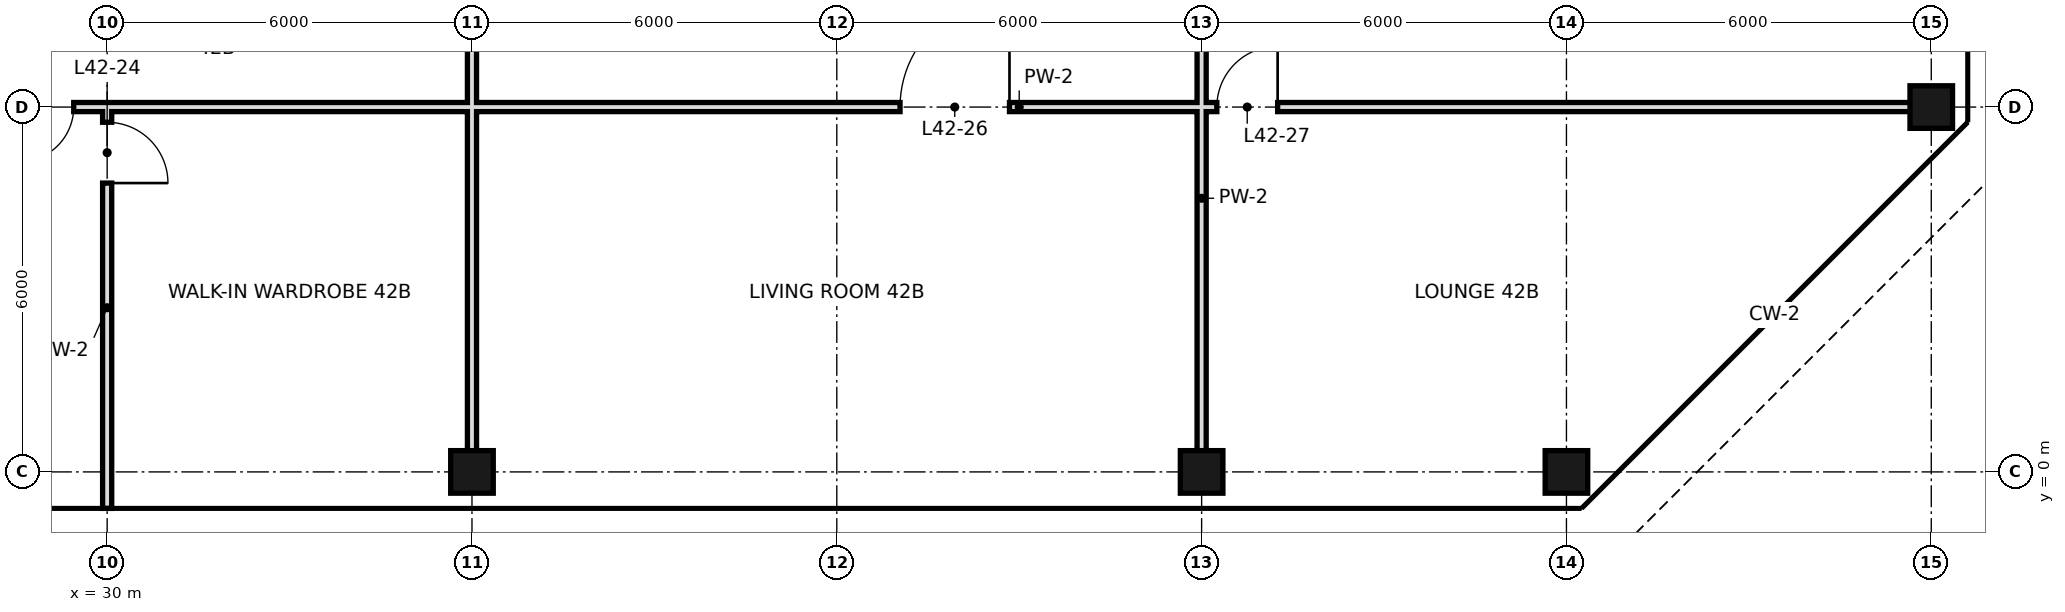
"""IFC4 building model, lengths in metres.
Left out: names, types, materials, properties, quantities, classifications, styles, units other than length and angle.
Written with IfcOpenShell. Run it as: python <this file> out.ifc"""

import sys

from ifc_helpers import new_model, si_unit, direction, frame, frame_2d, origin, origin_2d, place, context, subcontext, project, spatial, rectangle, hollow_rectangle, extrude, element, fill, save


model = new_model("IFC4")
c1 = context("Model", 3, precision=1e-05, world=origin(), true_north=direction((0.0, 1.0)))
c2 = subcontext(c1, "Body", "Model", "MODEL_VIEW")
j1 = project(units=[si_unit("LENGTHUNIT", "METRE"), si_unit("PLANEANGLEUNIT", "RADIAN")], contexts=[c1])
p1 = place(None, origin())
s1 = spatial("IfcSite", under=j1, at=p1, CompositionType="ELEMENT")
p2 = place(p1, origin())
s2 = spatial("IfcBuilding", under=s1, at=p2, CompositionType="ELEMENT")
p3 = place(p2, frame((0.0, 0.0, 181.6)))
s3 = spatial("IfcBuildingStorey", under=s2, at=p3, CompositionType="ELEMENT", Elevation=181.6)
for number, where, z_axis, x_axis in (
    (1, (36.0, 0.0, 0.0), (0.0, 0.0, 1.0), (1.0, 0.0, 0.0)),
    (2, (48.0, 0.0, 0.0), (0.0, 0.0, 1.0), (1.0, 0.0, 0.0)),
    (3, (54.0, 0.0, 0.0), (0.0, 0.0, 1.0), (1.0, 0.0, 0.0)),
    (4, (60.0, 6.0, 0.0), (0.0, 0.0, 1.0), (1.0, 0.0, 0.0)),
):
    element("IfcColumn", number, at=place(p3, frame(where, z_axis=z_axis, x_axis=x_axis)), inside=s3, PredefinedType="COLUMN", context=c2, shape_type="SweptSolid", body=[
        extrude(hollow_rectangle(XDim=0.7, YDim=0.7, WallThickness=0.036, at=origin_2d()), origin(), (0.0, 0.0, 1.0), 4.4),
    ])
p4 = place(p3, frame((30.0, -0.6, 0.0), z_axis=(0.0, 0.0, 1.0), x_axis=(0.0, 1.0, 0.0)))
e5 = element("IfcWall", 5, at=p4, inside=s3, PredefinedType="PARTITIONING", context=c2, shape_type="SweptSolid", body=[
    extrude(rectangle(XDim=6.6, YDim=0.15, at=frame_2d((3.3, 0.0))), origin(), (0.0, 0.0, 1.0), 3.4),
])
p5 = place(p4, frame((5.35, 0.0, 0.0)))
e6 = element("IfcOpeningElement", 6, at=p5, cuts=e5, PredefinedType="OPENING", context=c2, shape_type="SweptSolid", body=[
    extrude(rectangle(XDim=1.0, YDim=2.4, at=frame_2d((0.5, 1.2))), frame((0.0, 0.085, 0.0), z_axis=(0.0, -1.0, 0.0), x_axis=(1.0, 0.0, 0.0)), (0.0, 0.0, 1.0), 0.17),
])
p6 = place(p3, frame((36.0, 0.0, 0.0), z_axis=(0.0, 0.0, 1.0), x_axis=(0.0, 1.0, 0.0)))
e7 = element("IfcWall", 7, at=p6, inside=s3, PredefinedType="PARTITIONING", context=c2, shape_type="SweptSolid", body=[
    extrude(rectangle(XDim=6.0, YDim=0.15, at=frame_2d((3.0, 0.0))), origin(), (0.0, 0.0, 1.0), 3.4),
])
p7 = place(p3, frame((36.0, 6.0, 0.0), z_axis=(0.0, 0.0, 1.0), x_axis=(0.0, 1.0, 0.0)))
e8 = element("IfcWall", 8, at=p7, inside=s3, PredefinedType="PARTITIONING", context=c2, shape_type="SweptSolid", body=[
    extrude(rectangle(XDim=3.0, YDim=0.15, at=frame_2d((1.5, 0.0))), origin(), (0.0, 0.0, 1.0), 3.4),
])
p8 = place(p3, frame((48.0, 0.0, 0.0), z_axis=(0.0, 0.0, 1.0), x_axis=(0.0, 1.0, 0.0)))
e9 = element("IfcWall", 9, at=p8, inside=s3, PredefinedType="PARTITIONING", context=c2, shape_type="SweptSolid", body=[
    extrude(rectangle(XDim=9.0, YDim=0.15, at=frame_2d((4.5, 0.0))), origin(), (0.0, 0.0, 1.0), 3.4),
])
p9 = place(p3, frame((36.0, 6.0, 0.0), z_axis=(0.0, 0.0, 1.0), x_axis=(1.0, 0.0, 0.0)))
e10 = element("IfcWall", 10, at=p9, inside=s3, PredefinedType="PARTITIONING", context=c2, shape_type="SweptSolid", body=[
    extrude(rectangle(XDim=24.0, YDim=0.15, at=frame_2d((12.0, 0.0))), origin(), (0.0, 0.0, 1.0), 3.4),
])
p10 = place(p9, frame((7.04, 0.0, 0.0)))
e11 = element("IfcOpeningElement", 11, at=p10, cuts=e10, PredefinedType="OPENING", context=c2, shape_type="SweptSolid", body=[
    extrude(rectangle(XDim=1.8, YDim=2.4, at=frame_2d((0.9, 1.2))), frame((0.0, 0.085, 0.0), z_axis=(0.0, -1.0, 0.0), x_axis=(1.0, 0.0, 0.0)), (0.0, 0.0, 1.0), 0.17),
])
p11 = place(p9, frame((12.25, 0.0, 0.0)))
e12 = element("IfcOpeningElement", 12, at=p11, cuts=e10, PredefinedType="OPENING", context=c2, shape_type="SweptSolid", body=[
    extrude(rectangle(XDim=1.0, YDim=2.4, at=frame_2d((0.5, 1.2))), frame((0.0, 0.085, 0.0), z_axis=(0.0, -1.0, 0.0), x_axis=(1.0, 0.0, 0.0)), (0.0, 0.0, 1.0), 0.17),
])
p12 = place(p3, frame((27.6, 6.0, 0.0), z_axis=(0.0, 0.0, 1.0), x_axis=(1.0, 0.0, 0.0)))
e13 = element("IfcWall", 13, at=p12, inside=s3, PredefinedType="PARTITIONING", context=c2, shape_type="SweptSolid", body=[
    extrude(rectangle(XDim=8.4, YDim=0.15, at=frame_2d((4.2, 0.0))), origin(), (0.0, 0.0, 1.0), 3.65),
])
p13 = place(p12, frame((0.95, 0.0, 0.0)))
e14 = element("IfcOpeningElement", 14, at=p13, cuts=e13, PredefinedType="OPENING", context=c2, shape_type="SweptSolid", body=[
    extrude(rectangle(XDim=0.9, YDim=2.4, at=frame_2d((0.45, 1.2))), frame((0.0, 0.085, 0.0), z_axis=(0.0, -1.0, 0.0), x_axis=(1.0, 0.0, 0.0)), (0.0, 0.0, 1.0), 0.17),
])
p14 = place(p5, frame((1.0, 0.0, 0.0), z_axis=(0.0, 0.0, 1.0), x_axis=(-1.0, 0.0, 0.0)))
e15 = element("IfcDoor", 15, at=p14, inside=s3, OperationType="SINGLE_SWING_RIGHT", PredefinedType="DOOR", context=c2, shape_type="SweptSolid", body=[
    extrude(rectangle(XDim=1.0, YDim=2.4, at=frame_2d((0.5, 1.2))), frame((0.0, 0.025, 0.0), z_axis=(0.0, -1.0, 0.0), x_axis=(1.0, 0.0, 0.0)), (0.0, 0.0, 1.0), 0.05),
])
fill(e6, e15)
p15 = place(p13, frame((0.9, 0.0, 0.0), z_axis=(0.0, 0.0, 1.0), x_axis=(-1.0, 0.0, 0.0)))
e16 = element("IfcDoor", 16, at=p15, inside=s3, OperationType="SINGLE_SWING_RIGHT", PredefinedType="DOOR", context=c2, shape_type="SweptSolid", body=[
    extrude(rectangle(XDim=0.9, YDim=2.4, at=frame_2d((0.45, 1.2))), frame((0.0, 0.025, 0.0), z_axis=(0.0, -1.0, 0.0), x_axis=(1.0, 0.0, 0.0)), (0.0, 0.0, 1.0), 0.05),
])
fill(e14, e16)
p16 = place(p10, frame((1.8, 0.0, 0.0), z_axis=(0.0, 0.0, 1.0), x_axis=(-1.0, 0.0, 0.0)))
e17 = element("IfcDoor", 17, at=p16, inside=s3, OperationType="SINGLE_SWING_LEFT", PredefinedType="DOOR", context=c2, shape_type="SweptSolid", body=[
    extrude(rectangle(XDim=1.8, YDim=2.4, at=frame_2d((0.9, 1.2))), frame((0.0, 0.025, 0.0), z_axis=(0.0, -1.0, 0.0), x_axis=(1.0, 0.0, 0.0)), (0.0, 0.0, 1.0), 0.05),
])
fill(e11, e17)
p17 = place(p11, frame((1.0, 0.0, 0.0), z_axis=(0.0, 0.0, 1.0), x_axis=(-1.0, 0.0, 0.0)))
e18 = element("IfcDoor", 18, at=p17, inside=s3, OperationType="SINGLE_SWING_LEFT", PredefinedType="DOOR", context=c2, shape_type="SweptSolid", body=[
    extrude(rectangle(XDim=1.0, YDim=2.4, at=frame_2d((0.5, 1.2))), frame((0.0, 0.025, 0.0), z_axis=(0.0, -1.0, 0.0), x_axis=(1.0, 0.0, 0.0)), (0.0, 0.0, 1.0), 0.05),
])
fill(e12, e18)
save(model, sys.argv[1])
